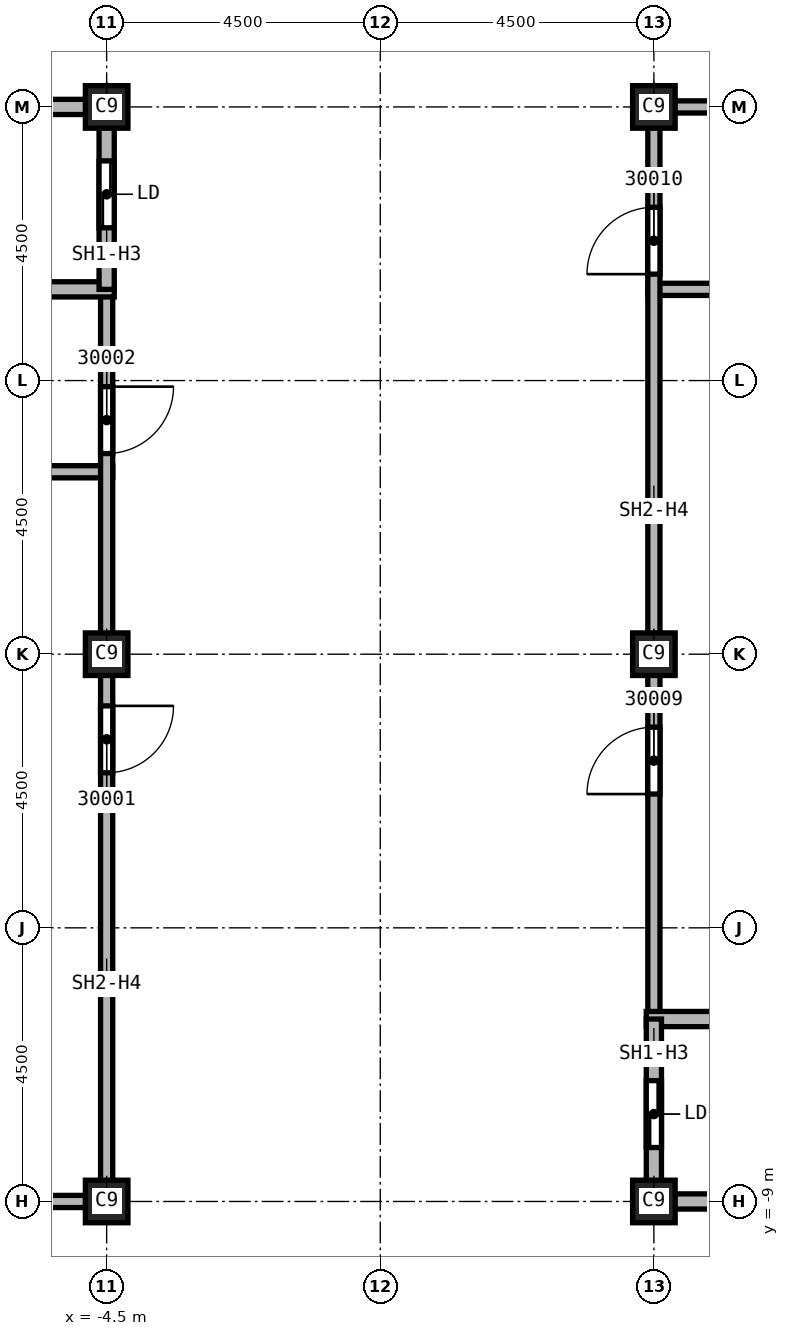
"""IFC4 building model, lengths in metres.
Left out: names, types, materials, properties, quantities, classifications, styles, units other than length and angle.
Written with IfcOpenShell. Run it as: python <this file> out.ifc"""

import sys

from ifc_helpers import new_model, si_unit, direction, frame, frame_2d, origin, origin_2d, place, context, subcontext, project, spatial, rectangle, extrude, element, fill, save


model = new_model("IFC4")
c1 = context("Model", 3, precision=1e-05, world=origin(), true_north=direction((0.0, 1.0)))
c2 = subcontext(c1, "Body", "Model", "MODEL_VIEW")
j1 = project(units=[si_unit("LENGTHUNIT", "METRE"), si_unit("PLANEANGLEUNIT", "RADIAN")], contexts=[c1])
p1 = place(None, origin())
s1 = spatial("IfcSite", under=j1, at=p1, CompositionType="ELEMENT")
p2 = place(p1, origin())
s2 = spatial("IfcBuilding", under=s1, at=p2, CompositionType="ELEMENT")
p3 = place(p2, frame((0.0, 0.0, 320.0)))
s3 = spatial("IfcBuildingStorey", under=s2, at=p3, CompositionType="ELEMENT", Elevation=320.0)
for number, where, z_axis, x_axis in (
    (1, (4.5, 0.0, 0.0), (0.0, 0.0, 1.0), (1.0, 0.0, 0.0)),
    (2, (4.5, 9.0, 0.0), (0.0, 0.0, 1.0), (1.0, 0.0, 0.0)),
    (3, (4.5, -9.0, 0.0), (0.0, 0.0, 1.0), (1.0, 0.0, 0.0)),
    (4, (-4.5, 0.0, 0.0), (0.0, 0.0, 1.0), (1.0, 0.0, 0.0)),
    (5, (-4.5, 9.0, 0.0), (0.0, 0.0, 1.0), (1.0, 0.0, 0.0)),
    (6, (-4.5, -9.0, 0.0), (0.0, 0.0, 1.0), (1.0, 0.0, 0.0)),
):
    element("IfcColumn", number, at=place(p3, frame(where, z_axis=z_axis, x_axis=x_axis)), inside=s3, PredefinedType="COLUMN", context=c2, shape_type="SweptSolid", body=[
        extrude(rectangle(XDim=0.7, YDim=0.7, at=origin_2d()), origin(), (0.0, 0.0, 1.0), 5.74),
    ])
p4 = place(p3, frame((-7.625, 3.0, 0.0), z_axis=(0.0, 0.0, 1.0), x_axis=(1.0, 0.0, 0.0)))
e7 = element("IfcWall", 7, at=p4, inside=s3, PredefinedType="SOLIDWALL", context=c2, shape_type="SweptSolid", body=[
    extrude(rectangle(XDim=3.225, YDim=0.2, at=frame_2d((1.613, 0.0))), origin(), (0.0, 0.0, 1.0), 5.74),
])
p5 = place(p3, frame((-4.5, -9.0, 0.0), z_axis=(0.0, 0.0, 1.0), x_axis=(-1.0, 0.0, 0.0)))
e8 = element("IfcWall", 8, at=p5, inside=s3, PredefinedType="SOLIDWALL", context=c2, shape_type="SweptSolid", body=[
    extrude(rectangle(XDim=3.0, YDim=0.2, at=frame_2d((1.5, 0.0))), origin(), (0.0, 0.0, 1.0), 5.062),
])
p6 = place(p3, frame((-4.5, 6.0, 0.0), z_axis=(0.0, 0.0, 1.0), x_axis=(0.0, -1.0, 0.0)))
e9 = element("IfcWall", 9, at=p6, inside=s3, PredefinedType="SOLIDWALL", context=c2, shape_type="SweptSolid", body=[
    extrude(rectangle(XDim=15.1, YDim=0.2, at=frame_2d((7.55, 0.0))), origin(), (0.0, 0.0, 1.0), 5.062),
])
p7 = place(p6, frame((6.85, 0.0, 0.0)))
e10 = element("IfcOpeningElement", 10, at=p7, cuts=e9, PredefinedType="OPENING", context=c2, shape_type="SweptSolid", body=[
    extrude(rectangle(XDim=1.1, YDim=2.1, at=frame_2d((0.55, 1.05))), frame((0.0, 0.1, 0.0), z_axis=(0.0, -1.0, 0.0), x_axis=(1.0, 0.0, 0.0)), (0.0, 0.0, 1.0), 0.2),
])
p8 = place(p6, frame((1.6, 0.0, 0.0)))
e11 = element("IfcOpeningElement", 11, at=p8, cuts=e9, PredefinedType="OPENING", context=c2, shape_type="SweptSolid", body=[
    extrude(rectangle(XDim=1.1, YDim=2.1, at=frame_2d((0.55, 1.05))), frame((0.0, 0.1, 0.0), z_axis=(0.0, -1.0, 0.0), x_axis=(1.0, 0.0, 0.0)), (0.0, 0.0, 1.0), 0.2),
])
p9 = place(p3, frame((4.4, 6.0, 0.0), z_axis=(0.0, 0.0, 1.0), x_axis=(1.0, 0.0, 0.0)))
e12 = element("IfcWall", 12, at=p9, inside=s3, PredefinedType="SOLIDWALL", context=c2, shape_type="SweptSolid", body=[
    extrude(rectangle(XDim=3.2, YDim=0.2, at=frame_2d((1.6, 0.0))), origin(), (0.0, 0.0, 1.0), 5.74),
])
p10 = place(p3, frame((4.5, -6.0, 0.0), z_axis=(0.0, 0.0, 1.0), x_axis=(0.0, 1.0, 0.0)))
e13 = element("IfcWall", 13, at=p10, inside=s3, PredefinedType="SOLIDWALL", context=c2, shape_type="SweptSolid", body=[
    extrude(rectangle(XDim=15.1, YDim=0.2, at=frame_2d((7.55, 0.0))), origin(), (0.0, 0.0, 1.0), 5.062),
])
p11 = place(p10, frame((3.7, 0.0, 0.0)))
e14 = element("IfcOpeningElement", 14, at=p11, cuts=e13, PredefinedType="OPENING", context=c2, shape_type="SweptSolid", body=[
    extrude(rectangle(XDim=1.1, YDim=2.1, at=frame_2d((0.55, 1.05))), frame((0.0, 0.1, 0.0), z_axis=(0.0, -1.0, 0.0), x_axis=(1.0, 0.0, 0.0)), (0.0, 0.0, 1.0), 0.2),
])
p12 = place(p10, frame((12.25, 0.0, 0.0)))
e15 = element("IfcOpeningElement", 15, at=p12, cuts=e13, PredefinedType="OPENING", context=c2, shape_type="SweptSolid", body=[
    extrude(rectangle(XDim=1.1, YDim=2.1, at=frame_2d((0.55, 1.05))), frame((0.0, 0.1, 0.0), z_axis=(0.0, -1.0, 0.0), x_axis=(1.0, 0.0, 0.0)), (0.0, 0.0, 1.0), 0.2),
])
p13 = place(p3, frame((4.5, 9.0, 0.0), z_axis=(0.0, 0.0, 1.0), x_axis=(1.0, 0.0, 0.0)))
e16 = element("IfcWall", 16, at=p13, inside=s3, PredefinedType="SOLIDWALL", context=c2, shape_type="SweptSolid", body=[
    extrude(rectangle(XDim=3.0, YDim=0.2, at=frame_2d((1.5, 0.0))), origin(), (0.0, 0.0, 1.0), 5.062),
])
p14 = place(p3, frame((-7.625, 6.0, 0.0), z_axis=(0.0, 0.0, 1.0), x_axis=(1.0, 0.0, 0.0)))
e17 = element("IfcWall", 17, at=p14, inside=s3, PredefinedType="SOLIDWALL", context=c2, shape_type="SweptSolid", body=[
    extrude(rectangle(XDim=3.25, YDim=0.25, at=frame_2d((1.625, 0.0))), origin(), (0.0, 0.0, 1.0), 5.74),
])
p15 = place(p3, frame((-7.5, 9.0, 0.0), z_axis=(0.0, 0.0, 1.0), x_axis=(1.0, 0.0, 0.0)))
e18 = element("IfcWall", 18, at=p15, inside=s3, PredefinedType="SOLIDWALL", context=c2, shape_type="SweptSolid", body=[
    extrude(rectangle(XDim=3.0, YDim=0.25, at=frame_2d((1.5, 0.0))), origin(), (0.0, 0.0, 1.0), 5.062),
])
p16 = place(p3, frame((-4.5, 9.125, 0.0), z_axis=(0.0, 0.0, 1.0), x_axis=(0.0, -1.0, 0.0)))
e19 = element("IfcWall", 19, at=p16, inside=s3, PredefinedType="SOLIDWALL", context=c2, shape_type="SweptSolid", body=[
    extrude(rectangle(XDim=3.125, YDim=0.25, at=frame_2d((1.562, 0.0))), origin(), (0.0, 0.0, 1.0), 5.062),
])
p17 = place(p16, frame((1.012, 0.0, 0.0)))
e20 = element("IfcOpeningElement", 20, at=p17, cuts=e19, PredefinedType="OPENING", context=c2, shape_type="SweptSolid", body=[
    extrude(rectangle(XDim=1.1, YDim=2.1, at=frame_2d((0.55, 1.05))), frame((0.0, 0.125, 0.0), z_axis=(0.0, -1.0, 0.0), x_axis=(1.0, 0.0, 0.0)), (0.0, 0.0, 1.0), 0.25),
])
p18 = place(p3, frame((4.375, -6.0, 0.0), z_axis=(0.0, 0.0, 1.0), x_axis=(1.0, 0.0, 0.0)))
e21 = element("IfcWall", 21, at=p18, inside=s3, PredefinedType="SOLIDWALL", context=c2, shape_type="SweptSolid", body=[
    extrude(rectangle(XDim=3.25, YDim=0.25, at=frame_2d((1.625, 0.0))), origin(), (0.0, 0.0, 1.0), 5.74),
])
p19 = place(p3, frame((4.5, -9.125, 0.0), z_axis=(0.0, 0.0, 1.0), x_axis=(0.0, 1.0, 0.0)))
e22 = element("IfcWall", 22, at=p19, inside=s3, PredefinedType="SOLIDWALL", context=c2, shape_type="SweptSolid", body=[
    extrude(rectangle(XDim=3.125, YDim=0.25, at=frame_2d((1.562, 0.0))), origin(), (0.0, 0.0, 1.0), 5.062),
])
p20 = place(p19, frame((1.012, 0.0, 0.0)))
e23 = element("IfcOpeningElement", 23, at=p20, cuts=e22, PredefinedType="OPENING", context=c2, shape_type="SweptSolid", body=[
    extrude(rectangle(XDim=1.1, YDim=2.1, at=frame_2d((0.55, 1.05))), frame((0.0, 0.125, 0.0), z_axis=(0.0, -1.0, 0.0), x_axis=(1.0, 0.0, 0.0)), (0.0, 0.0, 1.0), 0.25),
])
p21 = place(p3, frame((7.5, -9.0, 0.0), z_axis=(0.0, 0.0, 1.0), x_axis=(-1.0, 0.0, 0.0)))
e24 = element("IfcWall", 24, at=p21, inside=s3, PredefinedType="SOLIDWALL", context=c2, shape_type="SweptSolid", body=[
    extrude(rectangle(XDim=3.0, YDim=0.25, at=frame_2d((1.5, 0.0))), origin(), (0.0, 0.0, 1.0), 5.062),
])
p22 = place(p7, origin())
e25 = element("IfcDoor", 25, at=p22, inside=s3, OperationType="SINGLE_SWING_RIGHT", PredefinedType="DOOR", context=c2, shape_type="SweptSolid", body=[
    extrude(rectangle(XDim=1.1, YDim=2.1, at=frame_2d((0.55, 1.05))), frame((0.0, 0.025, 0.0), z_axis=(0.0, -1.0, 0.0), x_axis=(1.0, 0.0, 0.0)), (0.0, 0.0, 1.0), 0.05),
])
fill(e10, e25)
p23 = place(p8, origin())
e26 = element("IfcDoor", 26, at=p23, inside=s3, OperationType="SINGLE_SWING_LEFT", PredefinedType="DOOR", context=c2, shape_type="SweptSolid", body=[
    extrude(rectangle(XDim=1.1, YDim=2.1, at=frame_2d((0.55, 1.05))), frame((0.0, 0.025, 0.0), z_axis=(0.0, -1.0, 0.0), x_axis=(1.0, 0.0, 0.0)), (0.0, 0.0, 1.0), 0.05),
])
fill(e11, e26)
p24 = place(p11, origin())
e27 = element("IfcDoor", 27, at=p24, inside=s3, OperationType="SINGLE_SWING_RIGHT", PredefinedType="DOOR", context=c2, shape_type="SweptSolid", body=[
    extrude(rectangle(XDim=1.1, YDim=2.1, at=frame_2d((0.55, 1.05))), frame((0.0, 0.025, 0.0), z_axis=(0.0, -1.0, 0.0), x_axis=(1.0, 0.0, 0.0)), (0.0, 0.0, 1.0), 0.05),
])
fill(e14, e27)
p25 = place(p12, origin())
e28 = element("IfcDoor", 28, at=p25, inside=s3, OperationType="SINGLE_SWING_LEFT", PredefinedType="DOOR", context=c2, shape_type="SweptSolid", body=[
    extrude(rectangle(XDim=1.1, YDim=2.1, at=frame_2d((0.55, 1.05))), frame((0.0, 0.025, 0.0), z_axis=(0.0, -1.0, 0.0), x_axis=(1.0, 0.0, 0.0)), (0.0, 0.0, 1.0), 0.05),
])
fill(e15, e28)
p26 = place(p17, origin())
e29 = element("IfcDoor", 29, at=p26, inside=s3, OperationType="SLIDING_TO_LEFT", PredefinedType="DOOR", context=c2, shape_type="SweptSolid", body=[
    extrude(rectangle(XDim=1.1, YDim=2.1, at=frame_2d((0.55, 1.05))), frame((0.0, 0.025, 0.0), z_axis=(0.0, -1.0, 0.0), x_axis=(1.0, 0.0, 0.0)), (0.0, 0.0, 1.0), 0.05),
])
fill(e20, e29)
p27 = place(p20, origin())
e30 = element("IfcDoor", 30, at=p27, inside=s3, OperationType="SLIDING_TO_LEFT", PredefinedType="DOOR", context=c2, shape_type="SweptSolid", body=[
    extrude(rectangle(XDim=1.1, YDim=2.1, at=frame_2d((0.55, 1.05))), frame((0.0, 0.025, 0.0), z_axis=(0.0, -1.0, 0.0), x_axis=(1.0, 0.0, 0.0)), (0.0, 0.0, 1.0), 0.05),
])
fill(e23, e30)
save(model, sys.argv[1])
